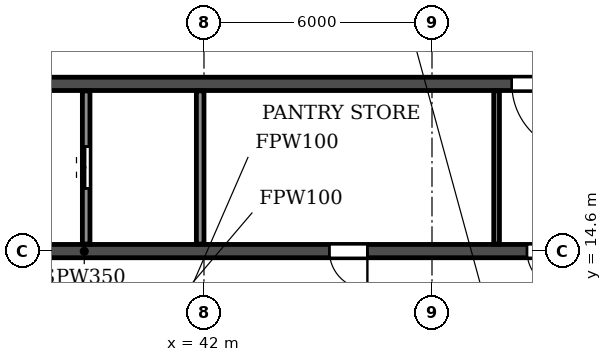
"""IFC4 building model, lengths in metres.
Left out: names, types, materials, properties, quantities, classifications, styles, units other than length and angle.
Written with IfcOpenShell. Run it as: python <this file> out.ifc"""

import sys

from ifc_helpers import new_model, si_unit, direction, frame, frame_2d, origin, place, context, subcontext, project, spatial, rectangle, extrude, element, fill, save


model = new_model("IFC4")
c1 = context("Model", 3, precision=1e-05, world=origin(), true_north=direction((0.0, 1.0)))
c2 = subcontext(c1, "Body", "Model", "MODEL_VIEW")
j1 = project(units=[si_unit("LENGTHUNIT", "METRE"), si_unit("PLANEANGLEUNIT", "RADIAN")], contexts=[c1])
p1 = place(None, origin())
s1 = spatial("IfcSite", under=j1, at=p1, CompositionType="ELEMENT")
p2 = place(p1, origin())
s2 = spatial("IfcBuilding", under=s1, at=p2, CompositionType="ELEMENT")
p3 = place(p2, frame((0.0, 0.0, 221.4)))
s3 = spatial("IfcBuildingStorey", under=s2, at=p3, CompositionType="ELEMENT", Elevation=221.4)
p4 = place(p3, frame((18.2, 14.6, 0.0), z_axis=(0.0, 0.0, 1.0), x_axis=(1.0, 0.0, 0.0)))
e1 = element("IfcWall", 1, at=p4, inside=s3, PredefinedType="SOLIDWALL", context=c2, shape_type="SweptSolid", body=[
    extrude(rectangle(XDim=65.6, YDim=0.35, at=frame_2d((32.8, 0.0))), origin(), (0.0, 0.0, 1.0), 3.08),
])
p5 = place(p4, frame((0.7, 0.0, 0.0)))
e2 = element("IfcOpeningElement", 2, at=p5, cuts=e1, PredefinedType="OPENING", context=c2, shape_type="SweptSolid", body=[
    extrude(rectangle(XDim=1.0, YDim=2.1, at=frame_2d((0.5, 1.05))), frame((0.0, 0.185, 0.0), z_axis=(0.0, -1.0, 0.0), x_axis=(1.0, 0.0, 0.0)), (0.0, 0.0, 1.0), 0.37),
])
p6 = place(p4, frame((8.6, 0.0, 0.0)))
e3 = element("IfcOpeningElement", 3, at=p6, cuts=e1, PredefinedType="OPENING", context=c2, shape_type="SweptSolid", body=[
    extrude(rectangle(XDim=1.0, YDim=2.1, at=frame_2d((0.5, 1.05))), frame((0.0, 0.185, 0.0), z_axis=(0.0, -1.0, 0.0), x_axis=(1.0, 0.0, 0.0)), (0.0, 0.0, 1.0), 0.37),
])
p7 = place(p4, frame((13.2, 0.0, 0.0)))
e4 = element("IfcOpeningElement", 4, at=p7, cuts=e1, PredefinedType="OPENING", context=c2, shape_type="SweptSolid", body=[
    extrude(rectangle(XDim=1.0, YDim=2.1, at=frame_2d((0.5, 1.05))), frame((0.0, 0.185, 0.0), z_axis=(0.0, -1.0, 0.0), x_axis=(1.0, 0.0, 0.0)), (0.0, 0.0, 1.0), 0.37),
])
p8 = place(p4, frame((27.1, 0.0, 0.0)))
e5 = element("IfcOpeningElement", 5, at=p8, cuts=e1, PredefinedType="OPENING", context=c2, shape_type="SweptSolid", body=[
    extrude(rectangle(XDim=1.0, YDim=2.1, at=frame_2d((0.5, 1.05))), frame((0.0, 0.185, 0.0), z_axis=(0.0, -1.0, 0.0), x_axis=(1.0, 0.0, 0.0)), (0.0, 0.0, 1.0), 0.37),
])
p9 = place(p4, frame((32.3, 0.0, 0.0)))
e6 = element("IfcOpeningElement", 6, at=p9, cuts=e1, PredefinedType="OPENING", context=c2, shape_type="SweptSolid", body=[
    extrude(rectangle(XDim=1.0, YDim=2.1, at=frame_2d((0.5, 1.05))), frame((0.0, 0.185, 0.0), z_axis=(0.0, -1.0, 0.0), x_axis=(1.0, 0.0, 0.0)), (0.0, 0.0, 1.0), 0.37),
])
p10 = place(p4, frame((35.95, 0.0, 0.0)))
e7 = element("IfcOpeningElement", 7, at=p10, cuts=e1, PredefinedType="OPENING", context=c2, shape_type="SweptSolid", body=[
    extrude(rectangle(XDim=1.5, YDim=2.1, at=frame_2d((0.75, 1.05))), frame((0.0, 0.185, 0.0), z_axis=(0.0, -1.0, 0.0), x_axis=(1.0, 0.0, 0.0)), (0.0, 0.0, 1.0), 0.37),
])
p11 = place(p4, frame((40.1, 0.0, 0.0)))
e8 = element("IfcOpeningElement", 8, at=p11, cuts=e1, PredefinedType="OPENING", context=c2, shape_type="SweptSolid", body=[
    extrude(rectangle(XDim=1.0, YDim=2.1, at=frame_2d((0.5, 1.05))), frame((0.0, 0.185, 0.0), z_axis=(0.0, -1.0, 0.0), x_axis=(1.0, 0.0, 0.0)), (0.0, 0.0, 1.0), 0.37),
])
p12 = place(p4, frame((51.4, 0.0, 0.0)))
e9 = element("IfcOpeningElement", 9, at=p12, cuts=e1, PredefinedType="OPENING", context=c2, shape_type="SweptSolid", body=[
    extrude(rectangle(XDim=1.0, YDim=2.1, at=frame_2d((0.5, 1.05))), frame((0.0, 0.185, 0.0), z_axis=(0.0, -1.0, 0.0), x_axis=(1.0, 0.0, 0.0)), (0.0, 0.0, 1.0), 0.37),
])
p13 = place(p4, frame((56.0, 0.0, 0.0)))
e10 = element("IfcOpeningElement", 10, at=p13, cuts=e1, PredefinedType="OPENING", context=c2, shape_type="SweptSolid", body=[
    extrude(rectangle(XDim=1.0, YDim=2.1, at=frame_2d((0.5, 1.05))), frame((0.0, 0.185, 0.0), z_axis=(0.0, -1.0, 0.0), x_axis=(1.0, 0.0, 0.0)), (0.0, 0.0, 1.0), 0.37),
])
p14 = place(p4, frame((63.9, 0.0, 0.0)))
e11 = element("IfcOpeningElement", 11, at=p14, cuts=e1, PredefinedType="OPENING", context=c2, shape_type="SweptSolid", body=[
    extrude(rectangle(XDim=1.0, YDim=2.1, at=frame_2d((0.5, 1.05))), frame((0.0, 0.185, 0.0), z_axis=(0.0, -1.0, 0.0), x_axis=(1.0, 0.0, 0.0)), (0.0, 0.0, 1.0), 0.37),
])
p15 = place(p3, frame((33.925, 19.0, 0.0), z_axis=(0.0, 0.0, 1.0), x_axis=(1.0, 0.0, 0.0)))
e12 = element("IfcWall", 12, at=p15, inside=s3, PredefinedType="SOLIDWALL", context=c2, shape_type="SweptSolid", body=[
    extrude(rectangle(XDim=34.15, YDim=0.35, at=frame_2d((17.075, 0.0))), origin(), (0.0, 0.0, 1.0), 3.08),
])
p16 = place(p15, frame((16.175, 0.0, 0.0)))
e13 = element("IfcOpeningElement", 13, at=p16, cuts=e12, PredefinedType="OPENING", context=c2, shape_type="SweptSolid", body=[
    extrude(rectangle(XDim=1.8, YDim=2.1, at=frame_2d((0.9, 1.05))), frame((0.0, 0.185, 0.0), z_axis=(0.0, -1.0, 0.0), x_axis=(1.0, 0.0, 0.0)), (0.0, 0.0, 1.0), 0.37),
])
p17 = place(p15, frame((1.525, 0.0, 0.0)))
e14 = element("IfcOpeningElement", 14, at=p17, cuts=e12, PredefinedType="OPENING", context=c2, shape_type="SweptSolid", body=[
    extrude(rectangle(XDim=1.8, YDim=2.1, at=frame_2d((0.9, 1.05))), frame((0.0, 0.185, 0.0), z_axis=(0.0, -1.0, 0.0), x_axis=(1.0, 0.0, 0.0)), (0.0, 0.0, 1.0), 0.37),
])
p18 = place(p15, frame((30.825, 0.0, 0.0)))
e15 = element("IfcOpeningElement", 15, at=p18, cuts=e12, PredefinedType="OPENING", context=c2, shape_type="SweptSolid", body=[
    extrude(rectangle(XDim=1.8, YDim=2.1, at=frame_2d((0.9, 1.05))), frame((0.0, 0.185, 0.0), z_axis=(0.0, -1.0, 0.0), x_axis=(1.0, 0.0, 0.0)), (0.0, 0.0, 1.0), 0.37),
])
p19 = place(p3, frame((49.7, 14.785, 0.0), z_axis=(0.0, 0.0, 1.0), x_axis=(0.0, 1.0, 0.0)))
e16 = element("IfcWall", 16, at=p19, inside=s3, PredefinedType="PARTITIONING", context=c2, shape_type="SweptSolid", body=[
    extrude(rectangle(XDim=4.03, YDim=0.15, at=frame_2d((2.015, 0.0))), origin(), (0.0, 0.0, 1.0), 3.08),
])
p20 = place(p3, frame((38.9, 14.785, 0.0), z_axis=(0.0, 0.0, 1.0), x_axis=(0.0, 1.0, 0.0)))
e17 = element("IfcWall", 17, at=p20, inside=s3, PredefinedType="PARTITIONING", context=c2, shape_type="SweptSolid", body=[
    extrude(rectangle(XDim=4.03, YDim=0.2, at=frame_2d((2.015, 0.0))), origin(), (0.0, 0.0, 1.0), 3.08),
])
p21 = place(p20, frame((1.465, 0.0, 0.0)))
e18 = element("IfcOpeningElement", 18, at=p21, cuts=e17, PredefinedType="OPENING", context=c2, shape_type="SweptSolid", body=[
    extrude(rectangle(XDim=1.1, YDim=2.1, at=frame_2d((0.55, 1.05))), frame((0.0, 0.11, 0.0), z_axis=(0.0, -1.0, 0.0), x_axis=(1.0, 0.0, 0.0)), (0.0, 0.0, 1.0), 0.22),
])
p22 = place(p3, frame((41.9, 14.785, 0.0), z_axis=(0.0, 0.0, 1.0), x_axis=(0.0, 1.0, 0.0)))
e19 = element("IfcWall", 19, at=p22, inside=s3, PredefinedType="PARTITIONING", context=c2, shape_type="SweptSolid", body=[
    extrude(rectangle(XDim=4.03, YDim=0.2, at=frame_2d((2.015, 0.0))), origin(), (0.0, 0.0, 1.0), 3.08),
])
p23 = place(p8, frame((1.0, 0.0, 0.0), z_axis=(0.0, 0.0, 1.0), x_axis=(-1.0, 0.0, 0.0)))
e20 = element("IfcDoor", 20, at=p23, inside=s3, OperationType="SINGLE_SWING_LEFT", PredefinedType="DOOR", context=c2, shape_type="SweptSolid", body=[
    extrude(rectangle(XDim=1.0, YDim=2.1, at=frame_2d((0.5, 1.05))), frame((0.0, 0.025, 0.0), z_axis=(0.0, -1.0, 0.0), x_axis=(1.0, 0.0, 0.0)), (0.0, 0.0, 1.0), 0.05),
])
fill(e5, e20)
p24 = place(p9, frame((1.0, 0.0, 0.0), z_axis=(0.0, 0.0, 1.0), x_axis=(-1.0, 0.0, 0.0)))
e21 = element("IfcDoor", 21, at=p24, inside=s3, OperationType="SINGLE_SWING_LEFT", PredefinedType="DOOR", context=c2, shape_type="SweptSolid", body=[
    extrude(rectangle(XDim=1.0, YDim=2.1, at=frame_2d((0.5, 1.05))), frame((0.0, 0.025, 0.0), z_axis=(0.0, -1.0, 0.0), x_axis=(1.0, 0.0, 0.0)), (0.0, 0.0, 1.0), 0.05),
])
fill(e6, e21)
p25 = place(p21, origin())
e22 = element("IfcDoor", 22, at=p25, inside=s3, OperationType="DOUBLE_DOOR_SLIDING", PredefinedType="DOOR", context=c2, shape_type="SweptSolid", body=[
    extrude(rectangle(XDim=1.1, YDim=2.1, at=frame_2d((0.55, 1.05))), frame((0.0, 0.025, 0.0), z_axis=(0.0, -1.0, 0.0), x_axis=(1.0, 0.0, 0.0)), (0.0, 0.0, 1.0), 0.05),
])
fill(e18, e22)
p26 = place(p16, frame((1.8, 0.0, 0.0), z_axis=(0.0, 0.0, 1.0), x_axis=(-1.0, 0.0, 0.0)))
e23 = element("IfcDoor", 23, at=p26, inside=s3, OperationType="DOUBLE_DOOR_SINGLE_SWING", PredefinedType="DOOR", context=c2, shape_type="SweptSolid", body=[
    extrude(rectangle(XDim=1.8, YDim=2.1, at=frame_2d((0.9, 1.05))), frame((0.0, 0.025, 0.0), z_axis=(0.0, -1.0, 0.0), x_axis=(1.0, 0.0, 0.0)), (0.0, 0.0, 1.0), 0.05),
])
fill(e13, e23)
save(model, sys.argv[1])
